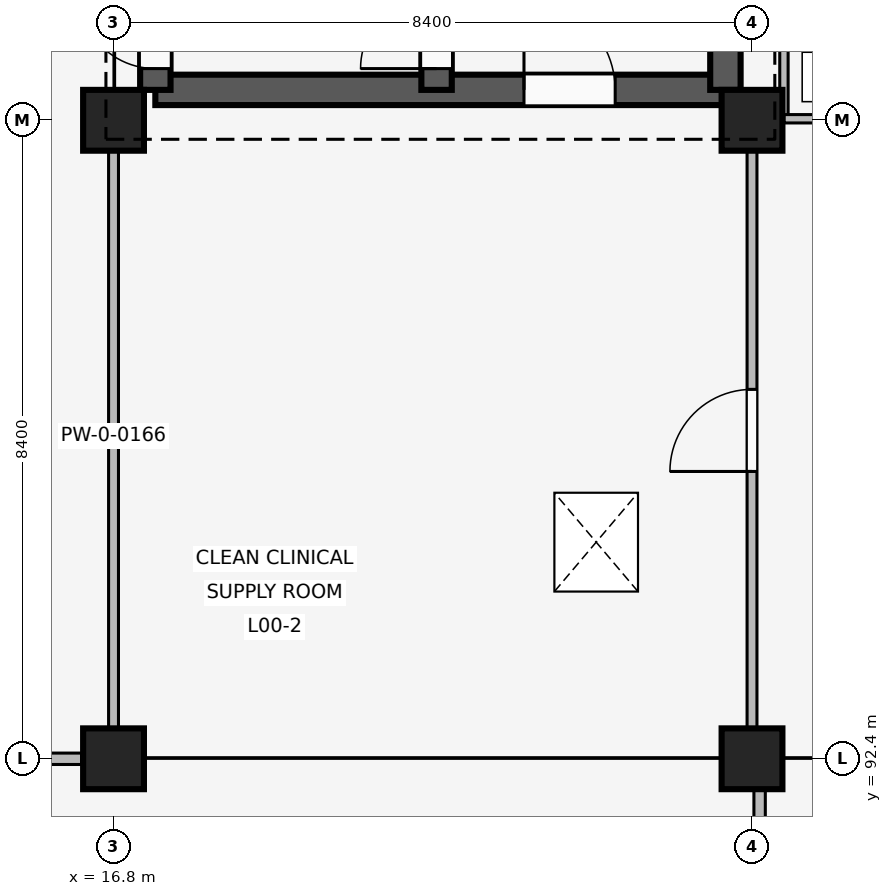
"""IFC4 building model, lengths in metres.
Left out: names, types, materials, properties, quantities, classifications, styles, units other than length and angle.
Written with IfcOpenShell. Run it as: python <this file> out.ifc"""

import sys

from ifc_helpers import new_model, si_unit, direction, frame, frame_2d, origin, origin_2d, place, context, subcontext, project, spatial, rectangle, extrude, element, fill, save


model = new_model("IFC4")
c1 = context("Model", 3, precision=1e-05, world=origin(), true_north=direction((0.0, 1.0)))
c2 = subcontext(c1, "Body", "Model", "MODEL_VIEW")
j1 = project(units=[si_unit("LENGTHUNIT", "METRE"), si_unit("PLANEANGLEUNIT", "RADIAN")], contexts=[c1])
p1 = place(None, origin())
s1 = spatial("IfcSite", under=j1, at=p1, CompositionType="ELEMENT")
p2 = place(p1, origin())
s2 = spatial("IfcBuilding", under=s1, at=p2, CompositionType="ELEMENT")
p3 = place(p2, origin())
s3 = spatial("IfcBuildingStorey", under=s2, at=p3, CompositionType="ELEMENT", Elevation=0.0)
for number, where, z_axis, x_axis in (
    (1, (16.8, 92.4, 0.0), (0.0, 0.0, 1.0), (1.0, 0.0, 0.0)),
    (2, (16.8, 100.8, 0.0), (0.0, 0.0, 1.0), (1.0, 0.0, 0.0)),
    (3, (25.2, 92.4, 0.0), (0.0, 0.0, 1.0), (1.0, 0.0, 0.0)),
    (4, (25.2, 100.8, 0.0), (0.0, 0.0, 1.0), (1.0, 0.0, 0.0)),
):
    element("IfcColumn", number, at=place(p3, frame(where, z_axis=z_axis, x_axis=x_axis)), inside=s3, PredefinedType="COLUMN", context=c2, shape_type="SweptSolid", body=[
        extrude(rectangle(XDim=0.8, YDim=0.8, at=origin_2d()), origin(), (0.0, 0.0, 1.0), 4.8),
    ])
p4 = place(p3, frame((17.35, 101.2, 0.0), z_axis=(0.0, 0.0, 1.0), x_axis=(1.0, 0.0, 0.0)))
e5 = element("IfcWall", 5, at=p4, inside=s3, PredefinedType="SHEAR", context=c2, shape_type="SweptSolid", body=[
    extrude(rectangle(XDim=7.5, YDim=0.4, at=frame_2d((3.75, 0.0))), origin(), (0.0, 0.0, 1.0), 4.52),
])
p5 = place(p4, frame((4.85, 0.0, 0.0)))
e6 = element("IfcOpeningElement", 6, at=p5, cuts=e5, PredefinedType="OPENING", context=c2, shape_type="SweptSolid", body=[
    extrude(rectangle(XDim=1.2, YDim=2.2, at=frame_2d((0.6, 1.1))), frame((0.0, 0.21, 0.0), z_axis=(0.0, -1.0, 0.0), x_axis=(1.0, 0.0, 0.0)), (0.0, 0.0, 1.0), 0.42),
])
p6 = place(p3, frame((17.35, 101.2, 0.0), z_axis=(0.0, 0.0, 1.0), x_axis=(0.0, 1.0, 0.0)))
e7 = element("IfcWall", 7, at=p6, inside=s3, PredefinedType="SHEAR", context=c2, shape_type="SweptSolid", body=[
    extrude(rectangle(XDim=7.55, YDim=0.4, at=frame_2d((3.775, 0.0))), origin(), (0.0, 0.0, 1.0), 4.52),
])
p7 = place(p6, frame((0.28, 0.0, 0.0)))
e8 = element("IfcOpeningElement", 8, at=p7, cuts=e7, PredefinedType="OPENING", context=c2, shape_type="SweptSolid", body=[
    extrude(rectangle(XDim=1.0, YDim=2.15, at=frame_2d((0.5, 1.075))), frame((0.0, 0.21, 0.0), z_axis=(0.0, -1.0, 0.0), x_axis=(1.0, 0.0, 0.0)), (0.0, 0.0, 1.0), 0.42),
])
p8 = place(p3, frame((24.85, 101.2, 0.0), z_axis=(0.0, 0.0, 1.0), x_axis=(0.0, 1.0, 0.0)))
e9 = element("IfcWall", 9, at=p8, inside=s3, PredefinedType="SHEAR", context=c2, shape_type="SweptSolid", body=[
    extrude(rectangle(XDim=7.55, YDim=0.4, at=frame_2d((3.775, 0.0))), origin(), (0.0, 0.0, 1.0), 4.52),
])
p9 = place(p8, frame((2.4, 0.0, 0.0)))
e10 = element("IfcOpeningElement", 10, at=p9, cuts=e9, PredefinedType="OPENING", context=c2, shape_type="SweptSolid", body=[
    extrude(rectangle(XDim=1.2, YDim=2.2, at=frame_2d((0.6, 1.1))), frame((0.0, 0.21, 0.0), z_axis=(0.0, -1.0, 0.0), x_axis=(1.0, 0.0, 0.0)), (0.0, 0.0, 1.0), 0.42),
])
p10 = place(p3, frame((21.05, 101.2, 0.0), z_axis=(0.0, 0.0, 1.0), x_axis=(0.0, 1.0, 0.0)))
e11 = element("IfcWall", 11, at=p10, inside=s3, PredefinedType="SHEAR", context=c2, shape_type="SweptSolid", body=[
    extrude(rectangle(XDim=7.55, YDim=0.4, at=frame_2d((3.775, 0.0))), origin(), (0.0, 0.0, 1.0), 4.52),
])
p11 = place(p10, frame((0.28, 0.0, 0.0)))
e12 = element("IfcOpeningElement", 12, at=p11, cuts=e11, PredefinedType="OPENING", context=c2, shape_type="SweptSolid", body=[
    extrude(rectangle(XDim=1.0, YDim=2.15, at=frame_2d((0.5, 1.075))), frame((0.0, 0.21, 0.0), z_axis=(0.0, -1.0, 0.0), x_axis=(1.0, 0.0, 0.0)), (0.0, 0.0, 1.0), 0.42),
])
p12 = place(p3, frame((16.8, 92.54, 0.0), z_axis=(0.0, 0.0, 1.0), x_axis=(0.0, 1.0, 0.0)))
e13 = element("IfcWall", 13, at=p12, inside=s3, PredefinedType="PARTITIONING", context=c2, shape_type="SweptSolid", body=[
    extrude(rectangle(XDim=8.21, YDim=0.13, at=frame_2d((4.105, 0.0))), origin(), (0.0, 0.0, 1.0), 3.8),
])
p13 = place(p3, frame((25.2, 92.54, 0.0), z_axis=(0.0, 0.0, 1.0), x_axis=(0.0, 1.0, 0.0)))
e14 = element("IfcWall", 14, at=p13, inside=s3, PredefinedType="PARTITIONING", context=c2, shape_type="SweptSolid", body=[
    extrude(rectangle(XDim=8.21, YDim=0.13, at=frame_2d((4.105, 0.0))), origin(), (0.0, 0.0, 1.0), 3.8),
])
p14 = place(p13, frame((3.64, 0.0, 0.0)))
e15 = element("IfcOpeningElement", 15, at=p14, cuts=e14, PredefinedType="OPENING", context=c2, shape_type="SweptSolid", body=[
    extrude(rectangle(XDim=1.08, YDim=2.15, at=frame_2d((0.54, 1.075))), frame((0.0, 0.075, 0.0), z_axis=(0.0, -1.0, 0.0), x_axis=(1.0, 0.0, 0.0)), (0.0, 0.0, 1.0), 0.15),
])
p15 = place(p3, frame((25.62, 100.82, 0.0), z_axis=(0.0, 0.0, 1.0), x_axis=(0.0, 1.0, 0.0)))
e16 = element("IfcWall", 16, at=p15, inside=s3, PredefinedType="PARTITIONING", context=c2, shape_type="SweptSolid", body=[
    extrude(rectangle(XDim=2.61, YDim=0.11, at=frame_2d((1.305, 0.0))), origin(), (0.0, 0.0, 1.0), 3.8),
])
p16 = place(p3, frame((25.62, 100.82, 0.0), z_axis=(0.0, 0.0, 1.0), x_axis=(1.0, 0.0, 0.0)))
e17 = element("IfcWall", 17, at=p16, inside=s3, PredefinedType="PARTITIONING", context=c2, shape_type="SweptSolid", body=[
    extrude(rectangle(XDim=1.98, YDim=0.11, at=frame_2d((0.99, 0.0))), origin(), (0.0, 0.0, 1.0), 3.8),
])
p17 = place(p16, frame((0.54, 0.0, 0.0)))
e18 = element("IfcOpeningElement", 18, at=p17, cuts=e17, PredefinedType="OPENING", context=c2, shape_type="SweptSolid", body=[
    extrude(rectangle(XDim=0.9, YDim=2.1, at=frame_2d((0.45, 1.05))), frame((0.0, 0.065, 0.0), z_axis=(0.0, -1.0, 0.0), x_axis=(1.0, 0.0, 0.0)), (0.0, 0.0, 1.0), 0.13),
])
p18 = place(p3, frame((25.3, 76.0, 0.0), z_axis=(0.0, 0.0, 1.0), x_axis=(0.0, 1.0, 0.0)))
e19 = element("IfcWall", 19, at=p18, inside=s3, PredefinedType="PARTITIONING", context=c2, shape_type="SweptSolid", body=[
    extrude(rectangle(XDim=16.0, YDim=0.15, at=frame_2d((8.0, 0.0))), origin(), (0.0, 0.0, 1.0), 3.8),
])
p19 = place(p18, frame((3.4, 0.0, 0.0)))
e20 = element("IfcOpeningElement", 20, at=p19, cuts=e19, PredefinedType="OPENING", context=c2, shape_type="SweptSolid", body=[
    extrude(rectangle(XDim=1.08, YDim=2.15, at=frame_2d((0.54, 1.075))), frame((0.0, 0.085, 0.0), z_axis=(0.0, -1.0, 0.0), x_axis=(1.0, 0.0, 0.0)), (0.0, 0.0, 1.0), 0.17),
])
p20 = place(p3, frame((0.42, 92.4, 0.0), z_axis=(0.0, 0.0, 1.0), x_axis=(1.0, 0.0, 0.0)))
e21 = element("IfcWall", 21, at=p20, inside=s3, PredefinedType="PARTITIONING", context=c2, shape_type="SweptSolid", body=[
    extrude(rectangle(XDim=15.96, YDim=0.15, at=frame_2d((7.98, 0.0))), origin(), (0.0, 0.0, 1.0), 3.8),
])
p21 = place(p20, frame((3.4, 0.0, 0.0)))
e22 = element("IfcOpeningElement", 22, at=p21, cuts=e21, PredefinedType="OPENING", context=c2, shape_type="SweptSolid", body=[
    extrude(rectangle(XDim=1.4, YDim=2.25, at=frame_2d((0.7, 1.125))), frame((0.0, 0.085, 0.0), z_axis=(0.0, -1.0, 0.0), x_axis=(1.0, 0.0, 0.0)), (0.0, 0.0, 1.0), 0.17),
])
p22 = place(p5, origin())
e23 = element("IfcDoor", 23, at=p22, inside=s3, OperationType="SINGLE_SWING_LEFT", PredefinedType="DOOR", context=c2, shape_type="SweptSolid", body=[
    extrude(rectangle(XDim=1.2, YDim=2.2, at=frame_2d((0.6, 1.1))), frame((0.0, 0.025, 0.0), z_axis=(0.0, -1.0, 0.0), x_axis=(1.0, 0.0, 0.0)), (0.0, 0.0, 1.0), 0.05),
])
fill(e6, e23)
p23 = place(p7, origin())
e24 = element("IfcDoor", 24, at=p23, inside=s3, OperationType="SINGLE_SWING_RIGHT", PredefinedType="DOOR", context=c2, shape_type="SweptSolid", body=[
    extrude(rectangle(XDim=1.0, YDim=2.15, at=frame_2d((0.5, 1.075))), frame((0.0, 0.025, 0.0), z_axis=(0.0, -1.0, 0.0), x_axis=(1.0, 0.0, 0.0)), (0.0, 0.0, 1.0), 0.05),
])
fill(e8, e24)
p24 = place(p11, origin())
e25 = element("IfcDoor", 25, at=p24, inside=s3, OperationType="SINGLE_SWING_LEFT", PredefinedType="DOOR", context=c2, shape_type="SweptSolid", body=[
    extrude(rectangle(XDim=1.0, YDim=2.15, at=frame_2d((0.5, 1.075))), frame((0.0, 0.025, 0.0), z_axis=(0.0, -1.0, 0.0), x_axis=(1.0, 0.0, 0.0)), (0.0, 0.0, 1.0), 0.05),
])
fill(e12, e25)
p25 = place(p14, origin())
e26 = element("IfcDoor", 26, at=p25, inside=s3, OperationType="SINGLE_SWING_LEFT", PredefinedType="DOOR", context=c2, shape_type="SweptSolid", body=[
    extrude(rectangle(XDim=1.08, YDim=2.15, at=frame_2d((0.54, 1.075))), frame((0.0, 0.025, 0.0), z_axis=(0.0, -1.0, 0.0), x_axis=(1.0, 0.0, 0.0)), (0.0, 0.0, 1.0), 0.05),
])
fill(e15, e26)
save(model, sys.argv[1])
